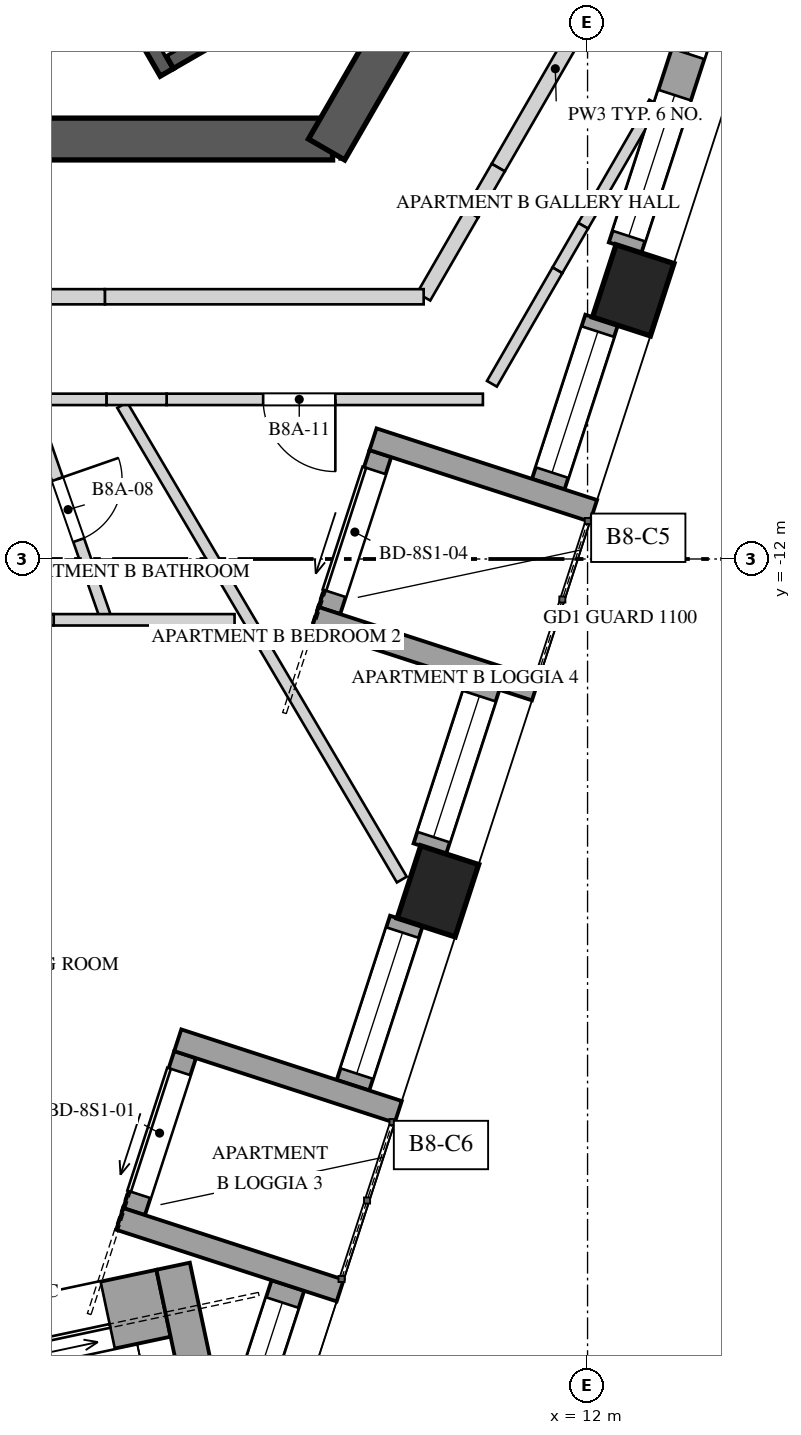
"""IFC4 building model, lengths in metres.
Left out: names, types, materials, properties, quantities, classifications, styles, units other than length and angle.
Written with IfcOpenShell. Run it as: python <this file> out.ifc"""

import sys

from ifc_helpers import new_model, si_unit, direction, frame, frame_2d, origin, origin_2d, place, context, subcontext, project, spatial, polyline, rectangle, outline, extrude, element, fill, save


model = new_model("IFC4")
c1 = context("Model", 3, precision=1e-05, world=origin(), true_north=direction((0.0, 1.0)))
c2 = subcontext(c1, "Body", "Model", "MODEL_VIEW")
j1 = project(units=[si_unit("LENGTHUNIT", "METRE"), si_unit("PLANEANGLEUNIT", "RADIAN")], contexts=[c1])
p1 = place(None, origin())
s1 = spatial("IfcSite", under=j1, at=p1, CompositionType="ELEMENT")
p2 = place(p1, origin())
s2 = spatial("IfcBuilding", under=s1, at=p2, CompositionType="ELEMENT")
p3 = place(p2, frame((0.0, 0.0, 320.4)))
s3 = spatial("IfcBuildingStorey", under=s2, at=p3, CompositionType="ELEMENT", Elevation=320.4)
p4 = place(p3, frame((-8.646, -6.475, 0.0), z_axis=(0.0, 0.0, 1.0), x_axis=(1.0, 0.0, 0.0)))
e1 = element("IfcWall", 1, at=p4, inside=s3, PredefinedType="SHEAR", context=c2, shape_type="SweptSolid", body=[
    extrude(rectangle(XDim=17.292, YDim=0.55, at=frame_2d((8.646, 0.0))), origin(), (0.0, 0.0, 1.0), 4.0),
])
p5 = place(p4, frame((6.851, 0.0, 0.0)))
e2 = element("IfcOpeningElement", 2, at=p5, cuts=e1, PredefinedType="OPENING", context=c2, shape_type="SweptSolid", body=[
    extrude(rectangle(XDim=1.0, YDim=2.4, at=frame_2d((0.5, 1.2))), frame((0.0, 0.285, 0.0), z_axis=(0.0, -1.0, 0.0), x_axis=(1.0, 0.0, 0.0)), (0.0, 0.0, 1.0), 0.57),
])
p6 = place(p3, frame((8.566, -6.613, 0.0), z_axis=(0.0, 0.0, 1.0), x_axis=(0.499995765644, 0.866027848477, 0.0)))
e3 = element("IfcWall", 3, at=p6, inside=s3, PredefinedType="SHEAR", context=c2, shape_type="SweptSolid", body=[
    extrude(rectangle(XDim=2.887, YDim=0.55, at=frame_2d((1.443, 0.0))), origin(), (0.0, 0.0, 1.0), 4.0),
])
for number, where, z_axis, x_axis in (
    (4, (10.032, -16.372, -0.35), (0.0, 0.0, 1.0), (0.309, 0.951, 0.0)),
    (5, (12.601, -8.465, -0.35), (0.0, 0.0, 1.0), (0.309, 0.951, 0.0)),
):
    element("IfcColumn", number, at=place(p3, frame(where, z_axis=z_axis, x_axis=x_axis)), inside=s3, PredefinedType="COLUMN", context=c2, shape_type="SweptSolid", body=[
        extrude(rectangle(XDim=1.0, YDim=0.8, at=origin_2d()), origin(), (0.0, 0.0, 1.0), 4.35),
    ])
p7 = place(p3, frame((7.541, -23.148, 0.0), z_axis=(0.0, 0.0, 1.0), x_axis=(0.308944042168, 0.951080216811, 0.0)))
e6 = element("IfcWall", 6, at=p7, inside=s3, PredefinedType="SOLIDWALL", context=c2, shape_type="SweptSolid", body=[
    extrude(rectangle(XDim=1.671, YDim=0.45, at=frame_2d((0.836, 0.0))), origin(), (0.0, 0.0, 1.0), 3.3),
])
p8 = place(p7, frame((0.236, 0.0, 0.4)))
e7 = element("IfcOpeningElement", 7, at=p8, cuts=e6, PredefinedType="OPENING", context=c2, shape_type="SweptSolid", body=[
    extrude(rectangle(XDim=1.2, YDim=2.1, at=frame_2d((0.6, 1.05))), frame((0.0, 0.235, 0.0), z_axis=(0.0, -1.0, 0.0), x_axis=(1.0, 0.0, 0.0)), (0.0, 0.0, 1.0), 0.47),
])
p9 = place(p3, frame((8.914, -18.923, 0.0), z_axis=(0.0, 0.0, 1.0), x_axis=(0.309059334219, 0.951042758204, 0.0)))
e8 = element("IfcWall", 8, at=p9, inside=s3, PredefinedType="SOLIDWALL", context=c2, shape_type="SweptSolid", body=[
    extrude(rectangle(XDim=2.271, YDim=0.45, at=frame_2d((1.135, 0.0))), origin(), (0.0, 0.0, 1.0), 3.3),
])
p10 = place(p9, frame((0.161, 0.0, 0.4)))
e9 = element("IfcOpeningElement", 9, at=p10, cuts=e8, PredefinedType="OPENING", context=c2, shape_type="SweptSolid", body=[
    extrude(rectangle(XDim=1.95, YDim=2.75, at=frame_2d((0.975, 1.375))), frame((0.0, 0.235, 0.0), z_axis=(0.0, -1.0, 0.0), x_axis=(1.0, 0.0, 0.0)), (0.0, 0.0, 1.0), 0.47),
])
p11 = place(p3, frame((9.925, -15.812, 0.0), z_axis=(0.0, 0.0, 1.0), x_axis=(0.308930512416, 0.95108461164, 0.0)))
e10 = element("IfcWall", 10, at=p11, inside=s3, PredefinedType="SOLIDWALL", context=c2, shape_type="SweptSolid", body=[
    extrude(rectangle(XDim=2.271, YDim=0.45, at=frame_2d((1.136, 0.0))), origin(), (0.0, 0.0, 1.0), 3.3),
])
p12 = place(p11, frame((0.161, 0.0, 0.4)))
e11 = element("IfcOpeningElement", 11, at=p12, cuts=e10, PredefinedType="OPENING", context=c2, shape_type="SweptSolid", body=[
    extrude(rectangle(XDim=1.95, YDim=2.1, at=frame_2d((0.975, 1.05))), frame((0.0, 0.235, 0.0), z_axis=(0.0, -1.0, 0.0), x_axis=(1.0, 0.0, 0.0)), (0.0, 0.0, 1.0), 0.47),
])
p13 = place(p3, frame((11.483, -11.016, 0.0), z_axis=(0.0, 0.0, 1.0), x_axis=(0.309027740273, 0.951053024674, 0.0)))
e12 = element("IfcWall", 12, at=p13, inside=s3, PredefinedType="SOLIDWALL", context=c2, shape_type="SweptSolid", body=[
    extrude(rectangle(XDim=2.271, YDim=0.45, at=frame_2d((1.136, 0.0))), origin(), (0.0, 0.0, 1.0), 3.3),
])
p14 = place(p13, frame((0.161, 0.0, 0.4)))
e13 = element("IfcOpeningElement", 13, at=p14, cuts=e12, PredefinedType="OPENING", context=c2, shape_type="SweptSolid", body=[
    extrude(rectangle(XDim=1.95, YDim=2.75, at=frame_2d((0.975, 1.375))), frame((0.0, 0.235, 0.0), z_axis=(0.0, -1.0, 0.0), x_axis=(1.0, 0.0, 0.0)), (0.0, 0.0, 1.0), 0.47),
])
p15 = place(p3, frame((12.494, -7.905, 0.0), z_axis=(0.0, 0.0, 1.0), x_axis=(0.309008326872, 0.951059332494, 0.0)))
e14 = element("IfcWall", 14, at=p15, inside=s3, PredefinedType="SOLIDWALL", context=c2, shape_type="SweptSolid", body=[
    extrude(rectangle(XDim=7.314, YDim=0.45, at=frame_2d((3.657, 0.0))), origin(), (0.0, 0.0, 1.0), 3.3),
])
p16 = place(p15, frame((0.161, 0.0, 0.4)))
e15 = element("IfcOpeningElement", 15, at=p16, cuts=e14, PredefinedType="OPENING", context=c2, shape_type="SweptSolid", body=[
    extrude(rectangle(XDim=1.95, YDim=2.75, at=frame_2d((0.975, 1.375))), frame((0.0, 0.235, 0.0), z_axis=(0.0, -1.0, 0.0), x_axis=(1.0, 0.0, 0.0)), (0.0, 0.0, 1.0), 0.47),
])
p17 = place(p15, frame((2.682, 0.0, 0.4)))
e16 = element("IfcOpeningElement", 16, at=p17, cuts=e14, PredefinedType="OPENING", context=c2, shape_type="SweptSolid", body=[
    extrude(rectangle(XDim=1.95, YDim=2.75, at=frame_2d((0.975, 1.375))), frame((0.0, 0.235, 0.0), z_axis=(0.0, -1.0, 0.0), x_axis=(1.0, 0.0, 0.0)), (0.0, 0.0, 1.0), 0.47),
])
p18 = place(p15, frame((5.203, 0.0, 0.4)))
e17 = element("IfcOpeningElement", 17, at=p18, cuts=e14, PredefinedType="OPENING", context=c2, shape_type="SweptSolid", body=[
    extrude(rectangle(XDim=1.95, YDim=2.75, at=frame_2d((0.975, 1.375))), frame((0.0, 0.235, 0.0), z_axis=(0.0, -1.0, 0.0), x_axis=(1.0, 0.0, 0.0)), (0.0, 0.0, 1.0), 0.47),
])
p19 = place(p3, frame((6.034, -20.585, 0.0), z_axis=(0.0, 0.0, 1.0), x_axis=(0.308999623589, 0.95106216023, 0.0)))
e18 = element("IfcWall", 18, at=p19, inside=s3, PredefinedType="SOLIDWALL", context=c2, shape_type="SweptSolid", body=[
    extrude(rectangle(XDim=2.171, YDim=0.3, at=frame_2d((1.085, 0.0))), origin(), (0.0, 0.0, 1.0), 3.3),
])
p20 = place(p19, frame((0.236, 0.0, 0.0)))
e19 = element("IfcOpeningElement", 19, at=p20, cuts=e18, PredefinedType="OPENING", context=c2, shape_type="SweptSolid", body=[
    extrude(rectangle(XDim=1.7, YDim=2.5, at=frame_2d((0.85, 1.25))), frame((0.0, 0.16, 0.0), z_axis=(0.0, -1.0, 0.0), x_axis=(1.0, 0.0, 0.0)), (0.0, 0.0, 1.0), 0.32),
])
for number, where, z_axis, x_axis in (
    (20, (8.746, -21.624, 0.0), (0.0, 0.0, 1.0), (-0.951, 0.309, 0.0)),
    (21, (9.51, -19.274, 0.0), (0.0, 0.0, 1.0), (-0.951, 0.309, 0.0)),
):
    element("IfcWall", number, at=place(p3, frame(where, z_axis=z_axis, x_axis=x_axis)), inside=s3, PredefinedType="SOLIDWALL", context=c2, shape_type="SweptSolid", body=[
        extrude(rectangle(XDim=3.05, YDim=0.3, at=frame_2d((1.525, 0.0))), origin(), (0.0, 0.0, 1.0), 3.3),
    ])
p21 = place(p3, frame((8.603, -12.678, 0.0), z_axis=(0.0, 0.0, 1.0), x_axis=(0.308999623589, 0.95106216023, 0.0)))
e22 = element("IfcWall", 22, at=p21, inside=s3, PredefinedType="SOLIDWALL", context=c2, shape_type="SweptSolid", body=[
    extrude(rectangle(XDim=2.171, YDim=0.3, at=frame_2d((1.085, 0.0))), origin(), (0.0, 0.0, 1.0), 3.3),
])
p22 = place(p21, frame((0.236, 0.0, 0.0)))
e23 = element("IfcOpeningElement", 23, at=p22, cuts=e22, PredefinedType="OPENING", context=c2, shape_type="SweptSolid", body=[
    extrude(rectangle(XDim=1.7, YDim=2.5, at=frame_2d((0.85, 1.25))), frame((0.0, 0.16, 0.0), z_axis=(0.0, -1.0, 0.0), x_axis=(1.0, 0.0, 0.0)), (0.0, 0.0, 1.0), 0.32),
])
for number, where, z_axis, x_axis in (
    (24, (11.315, -13.717, 0.0), (0.0, 0.0, 1.0), (-0.951, 0.309, 0.0)),
    (25, (12.079, -11.367, 0.0), (0.0, 0.0, 1.0), (-0.951, 0.309, 0.0)),
):
    element("IfcWall", number, at=place(p3, frame(where, z_axis=z_axis, x_axis=x_axis)), inside=s3, PredefinedType="SOLIDWALL", context=c2, shape_type="SweptSolid", body=[
        extrude(rectangle(XDim=3.05, YDim=0.3, at=frame_2d((1.525, 0.0))), origin(), (0.0, 0.0, 1.0), 3.3),
    ])
p23 = place(p3, frame((6.421, -21.791, 0.0), z_axis=(0.0, 0.0, 1.0), x_axis=(-0.978154241128, -0.207880447765, 0.0)))
e26 = element("IfcWall", 26, at=p23, inside=s3, PredefinedType="SOLIDWALL", context=c2, shape_type="SweptSolid", body=[
    extrude(rectangle(XDim=3.5, YDim=0.9, at=frame_2d((1.75, 0.0))), origin(), (0.0, 0.0, 1.0), 3.3),
])
p24 = place(p23, frame((0.75, 0.0, 0.0)))
e27 = element("IfcOpeningElement", 27, at=p24, cuts=e26, PredefinedType="OPENING", context=c2, shape_type="SweptSolid", body=[
    extrude(rectangle(XDim=2.0, YDim=2.4, at=frame_2d((1.0, 1.2))), frame((0.0, 0.46, 0.0), z_axis=(0.0, -1.0, 0.0), x_axis=(1.0, 0.0, 0.0)), (0.0, 0.0, 1.0), 0.92),
])
p25 = place(p3, frame((7.0, -23.436, 0.0), z_axis=(0.0, 0.0, 1.0), x_axis=(-0.207929769172, 0.978143757886, 0.0)))
e28 = element("IfcWall", 28, at=p25, inside=s3, PredefinedType="SOLIDWALL", context=c2, shape_type="SweptSolid", body=[
    extrude(rectangle(XDim=2.179, YDim=0.45, at=frame_2d((1.09, 0.0))), origin(), (0.0, 0.0, 1.0), 2.55),
])
p26 = place(p3, frame((6.465, -5.597, 0.0), z_axis=(0.0, 0.0, 1.0), x_axis=(-0.49998037582, 0.866036733513, 0.0)))
e29 = element("IfcWall", 29, at=p26, inside=s3, PredefinedType="SOLIDWALL", context=c2, shape_type="SweptSolid", body=[
    extrude(rectangle(XDim=6.2, YDim=0.2, at=frame_2d((3.1, 0.0))), origin(), (0.0, 0.0, 1.0), 3.65),
])
p27 = place(p3, frame((6.501, -5.461, 0.0), z_axis=(0.0, 0.0, 1.0), x_axis=(0.865989465428, 0.500062241894, 0.0)))
e30 = element("IfcWall", 30, at=p27, inside=s3, PredefinedType="SOLIDWALL", context=c2, shape_type="SweptSolid", body=[
    extrude(rectangle(XDim=2.55, YDim=0.2, at=frame_2d((1.275, 0.0))), origin(), (0.0, 0.0, 1.0), 3.65),
])
p28 = place(p3, frame((4.662, -9.904, 0.0), z_axis=(0.0, 0.0, 1.0), x_axis=(0.328468069606, -0.944515075184, 0.0)))
e31 = element("IfcWall", 31, at=p28, inside=s3, PredefinedType="PARTITIONING", context=c2, shape_type="SweptSolid", body=[
    extrude(rectangle(XDim=3.063, YDim=0.15, at=frame_2d((1.531, 0.0))), origin(), (0.0, 0.0, 1.0), 3.65),
])
p29 = place(p28, frame((1.106, 0.0, 0.0)))
e32 = element("IfcOpeningElement", 32, at=p29, cuts=e31, PredefinedType="OPENING", context=c2, shape_type="SweptSolid", body=[
    extrude(rectangle(XDim=0.85, YDim=2.4, at=frame_2d((0.425, 1.2))), frame((0.0, 0.085, 0.0), z_axis=(0.0, -1.0, 0.0), x_axis=(1.0, 0.0, 0.0)), (0.0, 0.0, 1.0), 0.17),
])
p30 = place(p3, frame((5.878, -9.975, 0.0), z_axis=(0.0, 0.0, 1.0), x_axis=(0.507681142474, -0.861545040945, 0.0)))
e33 = element("IfcWall", 33, at=p30, inside=s3, PredefinedType="PARTITIONING", context=c2, shape_type="SweptSolid", body=[
    extrude(rectangle(XDim=7.246, YDim=0.15, at=frame_2d((3.623, 0.0))), origin(), (0.0, 0.0, 1.0), 2.95),
])
p31 = place(p3, frame((7.356, -12.8, 0.0), z_axis=(0.0, 0.0, 1.0), x_axis=(-1.0, 0.0, 0.0)))
e34 = element("IfcWall", 34, at=p31, inside=s3, PredefinedType="PARTITIONING", context=c2, shape_type="SweptSolid", body=[
    extrude(rectangle(XDim=2.379, YDim=0.15, at=frame_2d((1.19, 0.0))), origin(), (0.0, 0.0, 1.0), 3.65),
])
p32 = place(p3, frame((4.977, -12.8, 0.0), z_axis=(0.0, 0.0, 1.0), x_axis=(-1.0, 0.0, 0.0)))
e35 = element("IfcWall", 35, at=p32, inside=s3, PredefinedType="PARTITIONING", context=c2, shape_type="SweptSolid", body=[
    extrude(outline(polyline([(0.0, 0.0), (1.392, 0.0), (1.392, 2.55), (0.474, 2.55), (0.474, 3.65), (0.0, 3.65), (0.0, 0.0)])), frame((0.0, 0.075, 0.0), z_axis=(0.0, -1.0, 0.0), x_axis=(1.0, 0.0, 0.0)), (0.0, 0.0, 1.0), 0.15),
])
p33 = place(p32, frame((0.05, 0.0, 0.0)))
e36 = element("IfcOpeningElement", 36, at=p33, cuts=e35, PredefinedType="OPENING", context=c2, shape_type="SweptSolid", body=[
    extrude(rectangle(XDim=0.95, YDim=2.4, at=frame_2d((0.475, 1.2))), frame((0.0, 0.085, 0.0), z_axis=(0.0, -1.0, 0.0), x_axis=(1.0, 0.0, 0.0)), (0.0, 0.0, 1.0), 0.17),
])
p34 = place(p3, frame((10.623, -9.9, 0.0), z_axis=(0.0, 0.0, 1.0), x_axis=(-1.0, 0.0, 0.0)))
e37 = element("IfcWall", 37, at=p34, inside=s3, PredefinedType="PARTITIONING", context=c2, shape_type="SweptSolid", body=[
    extrude(rectangle(XDim=4.161, YDim=0.15, at=frame_2d((2.081, 0.0))), origin(), (0.0, 0.0, 1.0), 3.65),
])
p35 = place(p34, frame((1.941, 0.0, 0.0)))
e38 = element("IfcOpeningElement", 38, at=p35, cuts=e37, PredefinedType="OPENING", context=c2, shape_type="SweptSolid", body=[
    extrude(rectangle(XDim=0.95, YDim=2.4, at=frame_2d((0.475, 1.2))), frame((0.0, 0.085, 0.0), z_axis=(0.0, -1.0, 0.0), x_axis=(1.0, 0.0, 0.0)), (0.0, 0.0, 1.0), 0.17),
])
p36 = place(p3, frame((6.462, -9.9, 0.0), z_axis=(0.0, 0.0, 1.0), x_axis=(-1.0, 0.0, 0.0)))
e39 = element("IfcWall", 39, at=p36, inside=s3, PredefinedType="PARTITIONING", context=c2, shape_type="SweptSolid", body=[
    extrude(rectangle(XDim=0.792, YDim=0.15, at=frame_2d((0.396, 0.0))), origin(), (0.0, 0.0, 1.0), 2.95),
])
p37 = place(p3, frame((5.67, -9.9, 0.0), z_axis=(0.0, 0.0, 1.0), x_axis=(-1.0, 0.0, 0.0)))
e40 = element("IfcWall", 40, at=p37, inside=s3, PredefinedType="PARTITIONING", context=c2, shape_type="SweptSolid", body=[
    extrude(rectangle(XDim=1.005, YDim=0.15, at=frame_2d((0.502, 0.0))), origin(), (0.0, 0.0, 1.0), 3.65),
])
p38 = place(p3, frame((12.878, -5.995, 0.0), z_axis=(0.0, 0.0, 1.0), x_axis=(-0.500053707499, -0.865994393525, 0.0)))
e41 = element("IfcWall", 41, at=p38, inside=s3, PredefinedType="PARTITIONING", context=c2, shape_type="SweptSolid", body=[
    extrude(rectangle(XDim=1.871, YDim=0.15, at=frame_2d((0.936, 0.0))), origin(), (0.0, 0.0, 1.0), 3.65),
])
p39 = place(p3, frame((11.942, -7.616, 0.0), z_axis=(0.0, 0.0, 1.0), x_axis=(-0.499826590014, -0.866125498941, 0.0)))
e42 = element("IfcWall", 42, at=p39, inside=s3, PredefinedType="PARTITIONING", context=c2, shape_type="SweptSolid", body=[
    extrude(rectangle(XDim=0.677, YDim=0.15, at=frame_2d((0.338, 0.0))), origin(), (0.0, 0.0, 1.0), 2.95),
])
p40 = place(p3, frame((11.604, -8.202, 0.0), z_axis=(0.0, 0.0, 1.0), x_axis=(-0.499992114976, -0.866029956157, 0.0)))
e43 = element("IfcWall", 43, at=p40, inside=s3, PredefinedType="PARTITIONING", context=c2, shape_type="SweptSolid", body=[
    extrude(rectangle(XDim=1.724, YDim=0.15, at=frame_2d((0.862, 0.0))), origin(), (0.0, 0.0, 1.0), 3.65),
])
p41 = place(p3, frame((12.326, -4.25, 0.0), z_axis=(0.0, 0.0, 1.0), x_axis=(-0.500003959331, -0.866023117852, 0.0)))
e44 = element("IfcWall", 44, at=p41, inside=s3, PredefinedType="SOLIDWALL", context=c2, shape_type="SweptSolid", body=[
    extrude(rectangle(XDim=3.003, YDim=0.2, at=frame_2d((1.501, 0.0))), origin(), (0.0, 0.0, 1.0), 3.65),
])
p42 = place(p3, frame((10.825, -6.851, 0.0), z_axis=(0.0, 0.0, 1.0), x_axis=(-0.500144223137, -0.865942120504, 0.0)))
e45 = element("IfcWall", 45, at=p42, inside=s3, PredefinedType="SOLIDWALL", context=c2, shape_type="SweptSolid", body=[
    extrude(rectangle(XDim=0.701, YDim=0.2, at=frame_2d((0.351, 0.0))), origin(), (0.0, 0.0, 1.0), 2.95),
])
p43 = place(p3, frame((10.474, -7.458, 0.0), z_axis=(0.0, 0.0, 1.0), x_axis=(-0.499929168788, -0.866066294342, 0.0)))
e46 = element("IfcWall", 46, at=p43, inside=s3, PredefinedType="SOLIDWALL", context=c2, shape_type="SweptSolid", body=[
    extrude(rectangle(XDim=1.261, YDim=0.2, at=frame_2d((0.63, 0.0))), origin(), (0.0, 0.0, 1.0), 3.65),
])
p44 = place(p3, frame((9.844, -8.55, 0.0), z_axis=(0.0, 0.0, 1.0), x_axis=(-1.0, 0.0, 0.0)))
e47 = element("IfcWall", 47, at=p44, inside=s3, PredefinedType="SOLIDWALL", context=c2, shape_type="SweptSolid", body=[
    extrude(rectangle(XDim=4.194, YDim=0.2, at=frame_2d((2.097, 0.0))), origin(), (0.0, 0.0, 1.0), 3.65),
])
p45 = place(p3, frame((5.649, -8.55, 0.0), z_axis=(0.0, 0.0, 1.0), x_axis=(-1.0, 0.0, 0.0)))
e48 = element("IfcWall", 48, at=p45, inside=s3, PredefinedType="SOLIDWALL", context=c2, shape_type="SweptSolid", body=[
    extrude(rectangle(XDim=0.821, YDim=0.2, at=frame_2d((0.411, 0.0))), origin(), (0.0, 0.0, 1.0), 2.95),
])
p46 = place(p8, origin())
e49 = element("IfcWindow", 49, at=p46, inside=s3, PartitioningType="SINGLE_PANEL", PredefinedType="WINDOW", context=c2, shape_type="SweptSolid", body=[
    extrude(rectangle(XDim=1.2, YDim=2.1, at=frame_2d((0.6, 1.05))), frame((0.0, 0.03, 0.0), z_axis=(0.0, -1.0, 0.0), x_axis=(1.0, 0.0, 0.0)), (0.0, 0.0, 1.0), 0.06),
])
fill(e7, e49)
p47 = place(p10, origin())
e50 = element("IfcWindow", 50, at=p47, inside=s3, PartitioningType="SINGLE_PANEL", PredefinedType="WINDOW", context=c2, shape_type="SweptSolid", body=[
    extrude(rectangle(XDim=1.95, YDim=2.75, at=frame_2d((0.975, 1.375))), frame((0.0, 0.03, 0.0), z_axis=(0.0, -1.0, 0.0), x_axis=(1.0, 0.0, 0.0)), (0.0, 0.0, 1.0), 0.06),
])
fill(e9, e50)
p48 = place(p12, origin())
e51 = element("IfcWindow", 51, at=p48, inside=s3, PartitioningType="SINGLE_PANEL", PredefinedType="WINDOW", context=c2, shape_type="SweptSolid", body=[
    extrude(rectangle(XDim=1.95, YDim=2.1, at=frame_2d((0.975, 1.05))), frame((0.0, 0.03, 0.0), z_axis=(0.0, -1.0, 0.0), x_axis=(1.0, 0.0, 0.0)), (0.0, 0.0, 1.0), 0.06),
])
fill(e11, e51)
p49 = place(p14, origin())
e52 = element("IfcWindow", 52, at=p49, inside=s3, PartitioningType="SINGLE_PANEL", PredefinedType="WINDOW", context=c2, shape_type="SweptSolid", body=[
    extrude(rectangle(XDim=1.95, YDim=2.75, at=frame_2d((0.975, 1.375))), frame((0.0, 0.03, 0.0), z_axis=(0.0, -1.0, 0.0), x_axis=(1.0, 0.0, 0.0)), (0.0, 0.0, 1.0), 0.06),
])
fill(e13, e52)
p50 = place(p16, origin())
e53 = element("IfcWindow", 53, at=p50, inside=s3, PartitioningType="SINGLE_PANEL", PredefinedType="WINDOW", context=c2, shape_type="SweptSolid", body=[
    extrude(rectangle(XDim=1.95, YDim=2.75, at=frame_2d((0.975, 1.375))), frame((0.0, 0.03, 0.0), z_axis=(0.0, -1.0, 0.0), x_axis=(1.0, 0.0, 0.0)), (0.0, 0.0, 1.0), 0.06),
])
fill(e15, e53)
p51 = place(p17, origin())
e54 = element("IfcWindow", 54, at=p51, inside=s3, PartitioningType="SINGLE_PANEL", PredefinedType="WINDOW", context=c2, shape_type="SweptSolid", body=[
    extrude(rectangle(XDim=1.95, YDim=2.75, at=frame_2d((0.975, 1.375))), frame((0.0, 0.03, 0.0), z_axis=(0.0, -1.0, 0.0), x_axis=(1.0, 0.0, 0.0)), (0.0, 0.0, 1.0), 0.06),
])
fill(e16, e54)
p52 = place(p20, origin())
e55 = element("IfcDoor", 55, at=p52, inside=s3, OperationType="SLIDING_TO_LEFT", PredefinedType="DOOR", context=c2, shape_type="SweptSolid", body=[
    extrude(rectangle(XDim=1.7, YDim=2.5, at=frame_2d((0.85, 1.25))), frame((0.0, 0.025, 0.0), z_axis=(0.0, -1.0, 0.0), x_axis=(1.0, 0.0, 0.0)), (0.0, 0.0, 1.0), 0.05),
])
fill(e19, e55)
p53 = place(p22, origin())
e56 = element("IfcDoor", 56, at=p53, inside=s3, OperationType="SLIDING_TO_LEFT", PredefinedType="DOOR", context=c2, shape_type="SweptSolid", body=[
    extrude(rectangle(XDim=1.7, YDim=2.5, at=frame_2d((0.85, 1.25))), frame((0.0, 0.025, 0.0), z_axis=(0.0, -1.0, 0.0), x_axis=(1.0, 0.0, 0.0)), (0.0, 0.0, 1.0), 0.05),
])
fill(e23, e56)
p54 = place(p24, origin())
e57 = element("IfcDoor", 57, at=p54, inside=s3, OperationType="SLIDING_TO_LEFT", PredefinedType="DOOR", context=c2, shape_type="SweptSolid", body=[
    extrude(rectangle(XDim=2.0, YDim=2.4, at=frame_2d((1.0, 1.2))), frame((0.0, 0.025, 0.0), z_axis=(0.0, -1.0, 0.0), x_axis=(1.0, 0.0, 0.0)), (0.0, 0.0, 1.0), 0.05),
])
fill(e27, e57)
p55 = place(p29, origin())
e58 = element("IfcDoor", 58, at=p55, inside=s3, OperationType="SINGLE_SWING_RIGHT", PredefinedType="DOOR", context=c2, shape_type="SweptSolid", body=[
    extrude(rectangle(XDim=0.85, YDim=2.4, at=frame_2d((0.425, 1.2))), frame((0.0, 0.025, 0.0), z_axis=(0.0, -1.0, 0.0), x_axis=(1.0, 0.0, 0.0)), (0.0, 0.0, 1.0), 0.05),
])
fill(e32, e58)
p56 = place(p35, origin())
e59 = element("IfcDoor", 59, at=p56, inside=s3, OperationType="SINGLE_SWING_LEFT", PredefinedType="DOOR", context=c2, shape_type="SweptSolid", body=[
    extrude(rectangle(XDim=0.95, YDim=2.4, at=frame_2d((0.475, 1.2))), frame((0.0, 0.025, 0.0), z_axis=(0.0, -1.0, 0.0), x_axis=(1.0, 0.0, 0.0)), (0.0, 0.0, 1.0), 0.05),
])
fill(e38, e59)
save(model, sys.argv[1])
